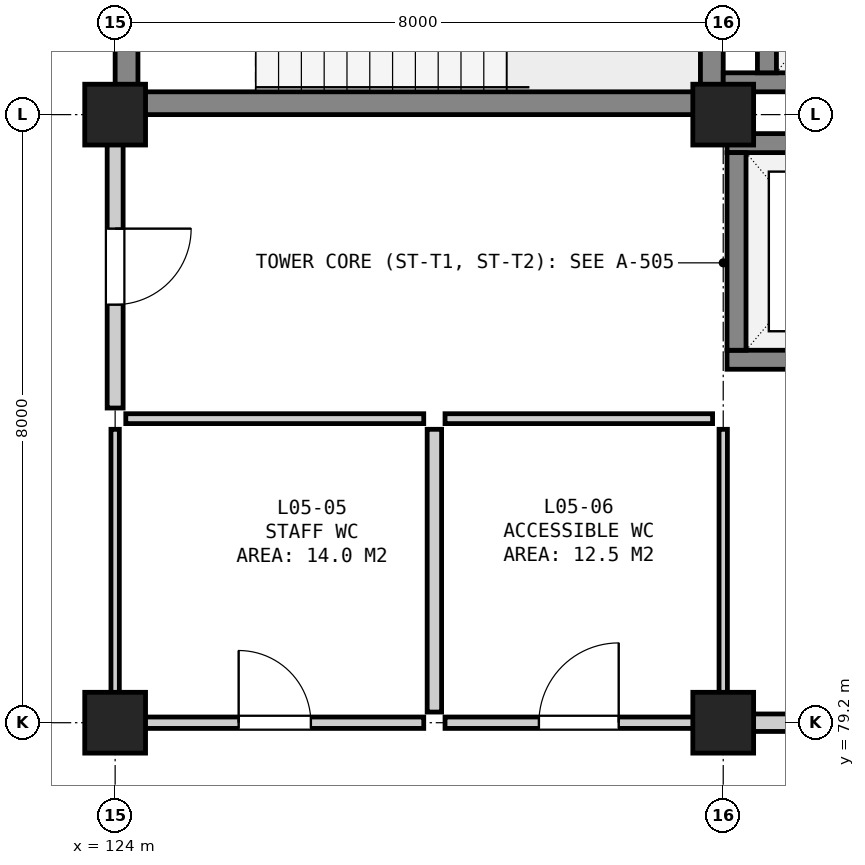
"""IFC4 building model, lengths in metres.
Left out: names, types, materials, properties, quantities, classifications, styles, units other than length and angle.
Written with IfcOpenShell. Run it as: python <this file> out.ifc"""

import sys

from ifc_helpers import new_model, si_unit, direction, frame, frame_2d, origin, origin_2d, place, context, subcontext, project, spatial, rectangle, extrude, element, fill, save


model = new_model("IFC4")
c1 = context("Model", 3, precision=1e-05, world=origin(), true_north=direction((0.0, 1.0)))
c2 = subcontext(c1, "Body", "Model", "MODEL_VIEW")
j1 = project(units=[si_unit("LENGTHUNIT", "METRE"), si_unit("PLANEANGLEUNIT", "RADIAN")], contexts=[c1])
p1 = place(None, origin())
s1 = spatial("IfcSite", under=j1, at=p1, CompositionType="ELEMENT")
p2 = place(p1, origin())
s2 = spatial("IfcBuilding", under=s1, at=p2, CompositionType="ELEMENT")
p3 = place(p2, frame((0.0, 0.0, 23.8)))
s3 = spatial("IfcBuildingStorey", under=s2, at=p3, CompositionType="ELEMENT", Elevation=23.8)
for number, where, z_axis, x_axis in (
    (1, (124.0, 79.2, 0.0), (0.0, 0.0, 1.0), (1.0, 0.0, 0.0)),
    (2, (124.0, 87.2, 0.0), (0.0, 0.0, 1.0), (1.0, 0.0, 0.0)),
    (3, (132.0, 79.2, 0.0), (0.0, 0.0, 1.0), (1.0, 0.0, 0.0)),
    (4, (132.0, 87.2, 0.0), (0.0, 0.0, 1.0), (1.0, 0.0, 0.0)),
):
    element("IfcColumn", number, at=place(p3, frame(where, z_axis=z_axis, x_axis=x_axis)), inside=s3, PredefinedType="COLUMN", context=c2, shape_type="SweptSolid", body=[
        extrude(rectangle(XDim=0.8, YDim=0.8, at=origin_2d()), origin(), (0.0, 0.0, 1.0), 4.0),
    ])
for number, where, z_axis, x_axis in (
    (5, (124.15, 87.2, 0.0), (0.0, 0.0, 1.0), (0.0, 1.0, 0.0)),
    (6, (131.85, 87.2, 0.0), (0.0, 0.0, 1.0), (0.0, 1.0, 0.0)),
):
    element("IfcWall", number, at=place(p3, frame(where, z_axis=z_axis, x_axis=x_axis)), inside=s3, PredefinedType="SHEAR", context=c2, shape_type="SweptSolid", body=[
        extrude(rectangle(XDim=4.2, YDim=0.3, at=frame_2d((2.1, 0.0))), origin(), (0.0, 0.0, 1.0), 3.72),
    ])
p4 = place(p3, frame((124.3, 87.35, 0.0), z_axis=(0.0, 0.0, 1.0), x_axis=(1.0, 0.0, 0.0)))
e7 = element("IfcWall", 7, at=p4, inside=s3, PredefinedType="SHEAR", context=c2, shape_type="SweptSolid", body=[
    extrude(rectangle(XDim=7.4, YDim=0.3, at=frame_2d((3.7, 0.0))), origin(), (0.0, 0.0, 1.0), 3.72),
])
p5 = place(p3, frame((132.0, 87.625, 0.0), z_axis=(0.0, 0.0, 1.0), x_axis=(1.0, 0.0, 0.0)))
e8 = element("IfcWall", 8, at=p5, inside=s3, PredefinedType="SHEAR", context=c2, shape_type="SweptSolid", body=[
    extrude(rectangle(XDim=3.15, YDim=0.25, at=frame_2d((1.575, 0.0))), origin(), (0.0, 0.0, 1.0), 3.72),
])
p6 = place(p3, frame((132.575, 87.75, 0.0), z_axis=(0.0, 0.0, 1.0), x_axis=(0.0, 1.0, 0.0)))
e9 = element("IfcWall", 9, at=p6, inside=s3, PredefinedType="SHEAR", context=c2, shape_type="SweptSolid", body=[
    extrude(rectangle(XDim=2.9, YDim=0.25, at=frame_2d((1.45, 0.0))), origin(), (0.0, 0.0, 1.0), 3.72),
])
p7 = place(p3, frame((132.05, 83.975, 0.0), z_axis=(0.0, 0.0, 1.0), x_axis=(1.0, 0.0, 0.0)))
e10 = element("IfcWall", 10, at=p7, inside=s3, PredefinedType="SHEAR", context=c2, shape_type="SweptSolid", body=[
    extrude(rectangle(XDim=2.7, YDim=0.25, at=frame_2d((1.35, 0.0))), origin(), (0.0, 0.0, 1.0), 3.72),
])
p8 = place(p7, frame((0.8, 0.0, 0.0)))
e11 = element("IfcOpeningElement", 11, at=p8, cuts=e10, PredefinedType="OPENING", context=c2, shape_type="SweptSolid", body=[
    extrude(rectangle(XDim=1.1, YDim=2.15, at=frame_2d((0.55, 1.075))), frame((0.0, 0.137, 0.0), z_axis=(0.0, -1.0, 0.0), x_axis=(1.0, 0.0, 0.0)), (0.0, 0.0, 1.0), 0.274),
])
p9 = place(p3, frame((132.05, 86.825, 0.0), z_axis=(0.0, 0.0, 1.0), x_axis=(1.0, 0.0, 0.0)))
e12 = element("IfcWall", 12, at=p9, inside=s3, PredefinedType="SHEAR", context=c2, shape_type="SweptSolid", body=[
    extrude(rectangle(XDim=2.7, YDim=0.25, at=frame_2d((1.35, 0.0))), origin(), (0.0, 0.0, 1.0), 3.72),
])
p10 = place(p3, frame((132.175, 84.1, 0.0), z_axis=(0.0, 0.0, 1.0), x_axis=(0.0, 1.0, 0.0)))
e13 = element("IfcWall", 13, at=p10, inside=s3, PredefinedType="SHEAR", context=c2, shape_type="SweptSolid", body=[
    extrude(rectangle(XDim=2.6, YDim=0.25, at=frame_2d((1.3, 0.0))), origin(), (0.0, 0.0, 1.0), 3.72),
])
p11 = place(p3, frame((124.14, 79.2, 0.0), z_axis=(0.0, 0.0, 1.0), x_axis=(1.0, 0.0, 0.0)))
e14 = element("IfcWall", 14, at=p11, inside=s3, PredefinedType="PARTITIONING", context=c2, shape_type="SweptSolid", body=[
    extrude(rectangle(XDim=3.92, YDim=0.15, at=frame_2d((1.96, 0.0))), origin(), (0.0, 0.0, 1.0), 3.195),
])
p12 = place(p11, frame((1.485, 0.0, 0.0)))
e15 = element("IfcOpeningElement", 15, at=p12, cuts=e14, PredefinedType="OPENING", context=c2, shape_type="SweptSolid", body=[
    extrude(rectangle(XDim=0.95, YDim=2.15, at=frame_2d((0.475, 1.075))), frame((0.0, 0.087, 0.0), z_axis=(0.0, -1.0, 0.0), x_axis=(1.0, 0.0, 0.0)), (0.0, 0.0, 1.0), 0.174),
])
p13 = place(p3, frame((124.14, 83.2, 0.0), z_axis=(0.0, 0.0, 1.0), x_axis=(1.0, 0.0, 0.0)))
e16 = element("IfcWall", 16, at=p13, inside=s3, PredefinedType="PARTITIONING", context=c2, shape_type="SweptSolid", body=[
    extrude(rectangle(XDim=3.92, YDim=0.13, at=frame_2d((1.96, 0.0))), origin(), (0.0, 0.0, 1.0), 3.72),
])
p14 = place(p3, frame((124.0, 79.34, 0.0), z_axis=(0.0, 0.0, 1.0), x_axis=(0.0, 1.0, 0.0)))
e17 = element("IfcWall", 17, at=p14, inside=s3, PredefinedType="PARTITIONING", context=c2, shape_type="SweptSolid", body=[
    extrude(rectangle(XDim=3.72, YDim=0.11, at=frame_2d((1.86, 0.0))), origin(), (0.0, 0.0, 1.0), 3.095),
])
p15 = place(p3, frame((128.2, 79.34, 0.0), z_axis=(0.0, 0.0, 1.0), x_axis=(0.0, 1.0, 0.0)))
e18 = element("IfcWall", 18, at=p15, inside=s3, PredefinedType="PARTITIONING", context=c2, shape_type="SweptSolid", body=[
    extrude(rectangle(XDim=3.72, YDim=0.19, at=frame_2d((1.86, 0.0))), origin(), (0.0, 0.0, 1.0), 3.72),
])
p16 = place(p3, frame((128.34, 79.2, 0.0), z_axis=(0.0, 0.0, 1.0), x_axis=(1.0, 0.0, 0.0)))
e19 = element("IfcWall", 19, at=p16, inside=s3, PredefinedType="PARTITIONING", context=c2, shape_type="SweptSolid", body=[
    extrude(rectangle(XDim=3.52, YDim=0.15, at=frame_2d((1.76, 0.0))), origin(), (0.0, 0.0, 1.0), 3.195),
])
p17 = place(p16, frame((1.235, 0.0, 0.0)))
e20 = element("IfcOpeningElement", 20, at=p17, cuts=e19, PredefinedType="OPENING", context=c2, shape_type="SweptSolid", body=[
    extrude(rectangle(XDim=1.05, YDim=2.15, at=frame_2d((0.525, 1.075))), frame((0.0, 0.087, 0.0), z_axis=(0.0, -1.0, 0.0), x_axis=(1.0, 0.0, 0.0)), (0.0, 0.0, 1.0), 0.174),
])
p18 = place(p3, frame((128.34, 83.2, 0.0), z_axis=(0.0, 0.0, 1.0), x_axis=(1.0, 0.0, 0.0)))
e21 = element("IfcWall", 21, at=p18, inside=s3, PredefinedType="PARTITIONING", context=c2, shape_type="SweptSolid", body=[
    extrude(rectangle(XDim=3.52, YDim=0.13, at=frame_2d((1.76, 0.0))), origin(), (0.0, 0.0, 1.0), 3.72),
])
p19 = place(p3, frame((132.0, 79.34, 0.0), z_axis=(0.0, 0.0, 1.0), x_axis=(0.0, 1.0, 0.0)))
e22 = element("IfcWall", 22, at=p19, inside=s3, PredefinedType="PARTITIONING", context=c2, shape_type="SweptSolid", body=[
    extrude(rectangle(XDim=3.72, YDim=0.11, at=frame_2d((1.86, 0.0))), origin(), (0.0, 0.0, 1.0), 2.845),
])
p20 = place(p3, frame((124.0, 83.34, 0.0), z_axis=(0.0, 0.0, 1.0), x_axis=(0.0, 1.0, 0.0)))
e23 = element("IfcWall", 23, at=p20, inside=s3, PredefinedType="SOLIDWALL", context=c2, shape_type="SweptSolid", body=[
    extrude(rectangle(XDim=3.72, YDim=0.21, at=frame_2d((1.86, 0.0))), origin(), (0.0, 0.0, 1.0), 3.095),
])
p21 = place(p20, frame((1.36, 0.0, 0.0)))
e24 = element("IfcOpeningElement", 24, at=p21, cuts=e23, PredefinedType="OPENING", context=c2, shape_type="SweptSolid", body=[
    extrude(rectangle(XDim=1.0, YDim=2.15, at=frame_2d((0.5, 1.075))), frame((0.0, 0.117, 0.0), z_axis=(0.0, -1.0, 0.0), x_axis=(1.0, 0.0, 0.0)), (0.0, 0.0, 1.0), 0.234),
])
p22 = place(p3, frame((132.14, 79.2, 0.0), z_axis=(0.0, 0.0, 1.0), x_axis=(1.0, 0.0, 0.0)))
e25 = element("IfcWall", 25, at=p22, inside=s3, PredefinedType="SOLIDWALL", context=c2, shape_type="SweptSolid", body=[
    extrude(rectangle(XDim=7.72, YDim=0.23, at=frame_2d((3.86, 0.0))), origin(), (0.0, 0.0, 1.0), 3.195),
])
p23 = place(p22, frame((3.11, 0.0, 0.0)))
e26 = element("IfcOpeningElement", 26, at=p23, cuts=e25, PredefinedType="OPENING", context=c2, shape_type="SweptSolid", body=[
    extrude(rectangle(XDim=1.5, YDim=2.2, at=frame_2d((0.75, 1.1))), frame((0.0, 0.127, 0.0), z_axis=(0.0, -1.0, 0.0), x_axis=(1.0, 0.0, 0.0)), (0.0, 0.0, 1.0), 0.254),
])
p24 = place(p12, origin())
e27 = element("IfcDoor", 27, at=p24, inside=s3, OperationType="SINGLE_SWING_LEFT", PredefinedType="DOOR", context=c2, shape_type="SweptSolid", body=[
    extrude(rectangle(XDim=0.95, YDim=2.15, at=frame_2d((0.475, 1.075))), frame((0.0, 0.025, 0.0), z_axis=(0.0, -1.0, 0.0), x_axis=(1.0, 0.0, 0.0)), (0.0, 0.0, 1.0), 0.05),
])
fill(e15, e27)
p25 = place(p17, origin())
e28 = element("IfcDoor", 28, at=p25, inside=s3, OperationType="SINGLE_SWING_RIGHT", PredefinedType="DOOR", context=c2, shape_type="SweptSolid", body=[
    extrude(rectangle(XDim=1.05, YDim=2.15, at=frame_2d((0.525, 1.075))), frame((0.0, 0.025, 0.0), z_axis=(0.0, -1.0, 0.0), x_axis=(1.0, 0.0, 0.0)), (0.0, 0.0, 1.0), 0.05),
])
fill(e20, e28)
p26 = place(p21, frame((1.0, 0.0, 0.0), z_axis=(0.0, 0.0, 1.0), x_axis=(-1.0, 0.0, 0.0)))
e29 = element("IfcDoor", 29, at=p26, inside=s3, OperationType="SINGLE_SWING_LEFT", PredefinedType="DOOR", context=c2, shape_type="SweptSolid", body=[
    extrude(rectangle(XDim=1.0, YDim=2.15, at=frame_2d((0.5, 1.075))), frame((0.0, 0.025, 0.0), z_axis=(0.0, -1.0, 0.0), x_axis=(1.0, 0.0, 0.0)), (0.0, 0.0, 1.0), 0.05),
])
fill(e24, e29)
save(model, sys.argv[1])
